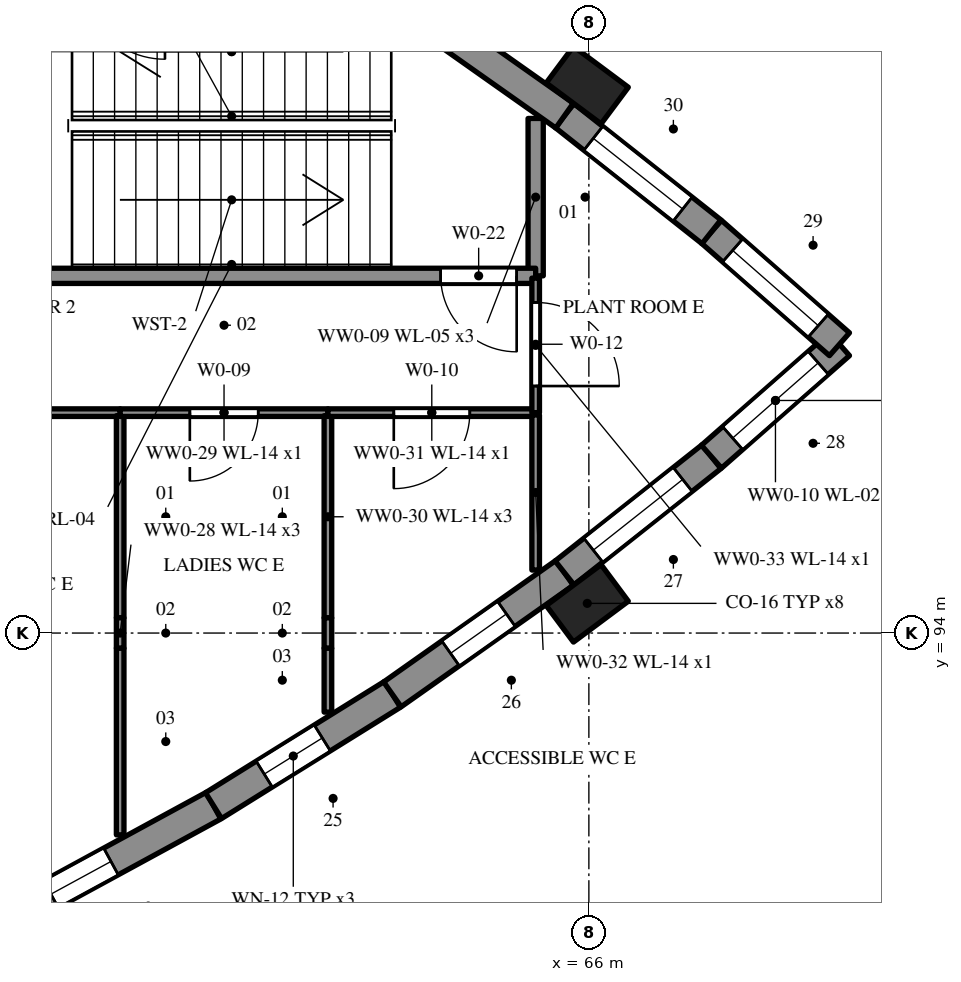
"""IFC4 building model, lengths in metres.
Left out: names, types, materials, properties, quantities, classifications, styles, units other than length and angle.
Written with IfcOpenShell. Run it as: python <this file> out.ifc"""

import sys

from ifc_helpers import new_model, si_unit, direction, frame, frame_2d, origin, origin_2d, place, context, subcontext, project, spatial, rectangle, extrude, element, fill, save


model = new_model("IFC4")
c1 = context("Model", 3, precision=1e-05, world=origin(), true_north=direction((0.0, 1.0)))
c2 = subcontext(c1, "Body", "Model", "MODEL_VIEW")
j1 = project(units=[si_unit("LENGTHUNIT", "METRE"), si_unit("PLANEANGLEUNIT", "RADIAN")], contexts=[c1])
p1 = place(None, origin())
s1 = spatial("IfcSite", under=j1, at=p1, CompositionType="ELEMENT")
p2 = place(p1, origin())
s2 = spatial("IfcBuilding", under=s1, at=p2, CompositionType="ELEMENT")
p3 = place(p2, origin())
s3 = spatial("IfcBuildingStorey", under=s2, at=p3, CompositionType="ELEMENT", Elevation=0.0)
p4 = place(p3, frame((65.3, 100.771, -0.25), z_axis=(0.0, 0.0, 1.0), x_axis=(0.0, -1.0, 0.0)))
e1 = element("IfcWall", 1, at=p4, inside=s3, PredefinedType="SHEAR", context=c2, shape_type="SweptSolid", body=[
    extrude(rectangle(XDim=2.071, YDim=0.2, at=frame_2d((1.035, 0.0))), origin(), (0.0, 0.0, 1.0), 5.65),
])
p5 = place(p3, frame((65.3, 98.7, -0.25), z_axis=(0.0, 0.0, 1.0), x_axis=(-1.0, 0.0, 0.0)))
e2 = element("IfcWall", 2, at=p5, inside=s3, PredefinedType="SHEAR", context=c2, shape_type="SweptSolid", body=[
    extrude(rectangle(XDim=8.2, YDim=0.2, at=frame_2d((4.1, 0.0))), origin(), (0.0, 0.0, 1.0), 5.65),
])
p6 = place(p5, frame((0.25, 0.0, 0.25)))
e3 = element("IfcOpeningElement", 3, at=p6, cuts=e2, PredefinedType="OPENING", context=c2, shape_type="SweptSolid", body=[
    extrude(rectangle(XDim=1.0, YDim=2.4, at=frame_2d((0.5, 1.2))), frame((0.0, 0.11, 0.0), z_axis=(0.0, -1.0, 0.0), x_axis=(1.0, 0.0, 0.0)), (0.0, 0.0, 1.0), 0.22),
])
p7 = place(p3, frame((58.627, 90.404, -0.25), z_axis=(0.0, 0.0, 1.0), x_axis=(0.878292493566, 0.478123724308, 0.0)))
e4 = element("IfcWall", 4, at=p7, inside=s3, PredefinedType="SOLIDWALL", context=c2, shape_type="SweptSolid", body=[
    extrude(rectangle(XDim=2.772, YDim=0.4, at=frame_2d((1.386, 0.0))), origin(), (0.0, 0.0, 1.0), 5.65),
])
p8 = place(p7, frame((0.336, 0.0, 1.85)))
e5 = element("IfcOpeningElement", 5, at=p8, cuts=e4, PredefinedType="OPENING", context=c2, shape_type="SweptSolid", body=[
    extrude(rectangle(XDim=0.9, YDim=0.6, at=frame_2d((0.45, 0.3))), frame((0.0, 0.21, 0.0), z_axis=(0.0, -1.0, 0.0), x_axis=(1.0, 0.0, 0.0)), (0.0, 0.0, 1.0), 0.42),
])
p9 = place(p3, frame((61.062, 91.729, -0.25), z_axis=(0.0, 0.0, 1.0), x_axis=(0.84912946359, 0.528184772653, 0.0)))
e6 = element("IfcWall", 6, at=p9, inside=s3, PredefinedType="SOLIDWALL", context=c2, shape_type="SweptSolid", body=[
    extrude(rectangle(XDim=2.772, YDim=0.4, at=frame_2d((1.386, 0.0))), origin(), (0.0, 0.0, 1.0), 5.65),
])
p10 = place(p9, frame((0.786, 0.0, 1.85)))
e7 = element("IfcOpeningElement", 7, at=p10, cuts=e6, PredefinedType="OPENING", context=c2, shape_type="SweptSolid", body=[
    extrude(rectangle(XDim=0.9, YDim=0.6, at=frame_2d((0.45, 0.3))), frame((0.0, 0.21, 0.0), z_axis=(0.0, -1.0, 0.0), x_axis=(1.0, 0.0, 0.0)), (0.0, 0.0, 1.0), 0.42),
])
p11 = place(p3, frame((63.415, 93.193, -0.25), z_axis=(0.0, 0.0, 1.0), x_axis=(0.817028877428, 0.576596751161, 0.0)))
e8 = element("IfcWall", 8, at=p11, inside=s3, PredefinedType="SOLIDWALL", context=c2, shape_type="SweptSolid", body=[
    extrude(rectangle(XDim=2.772, YDim=0.4, at=frame_2d((1.386, 0.0))), origin(), (0.0, 0.0, 1.0), 5.65),
])
p12 = place(p11, frame((0.936, 0.0, 1.85)))
e9 = element("IfcOpeningElement", 9, at=p12, cuts=e8, PredefinedType="OPENING", context=c2, shape_type="SweptSolid", body=[
    extrude(rectangle(XDim=0.9, YDim=0.6, at=frame_2d((0.45, 0.3))), frame((0.0, 0.21, 0.0), z_axis=(0.0, -1.0, 0.0), x_axis=(1.0, 0.0, 0.0)), (0.0, 0.0, 1.0), 0.42),
])
p13 = place(p3, frame((65.68, 94.792, -0.25), z_axis=(0.0, 0.0, 1.0), x_axis=(0.784278812541, 0.620408530082, 0.0)))
e10 = element("IfcWall", 10, at=p13, inside=s3, PredefinedType="SOLIDWALL", context=c2, shape_type="SweptSolid", body=[
    extrude(rectangle(XDim=2.464, YDim=0.4, at=frame_2d((1.232, 0.0))), origin(), (0.0, 0.0, 1.0), 5.65),
])
p14 = place(p13, frame((0.482, 0.0, 2.65)))
e11 = element("IfcOpeningElement", 11, at=p14, cuts=e10, PredefinedType="OPENING", context=c2, shape_type="SweptSolid", body=[
    extrude(rectangle(XDim=1.5, YDim=0.6, at=frame_2d((0.75, 0.3))), frame((0.0, 0.21, 0.0), z_axis=(0.0, -1.0, 0.0), x_axis=(1.0, 0.0, 0.0)), (0.0, 0.0, 1.0), 0.42),
])
p15 = place(p3, frame((67.613, 96.32, -0.25), z_axis=(0.0, 0.0, 1.0), x_axis=(0.751212351098, 0.660060605973, 0.0)))
e12 = element("IfcWall", 12, at=p15, inside=s3, PredefinedType="SOLIDWALL", context=c2, shape_type="SweptSolid", body=[
    extrude(rectangle(XDim=2.242, YDim=0.4, at=frame_2d((1.121, 0.0))), origin(), (0.0, 0.0, 1.0), 5.65),
])
p16 = place(p15, frame((0.371, 0.0, 2.65)))
e13 = element("IfcOpeningElement", 13, at=p16, cuts=e12, PredefinedType="OPENING", context=c2, shape_type="SweptSolid", body=[
    extrude(rectangle(XDim=1.5, YDim=0.6, at=frame_2d((0.75, 0.3))), frame((0.0, 0.21, 0.0), z_axis=(0.0, -1.0, 0.0), x_axis=(1.0, 0.0, 0.0)), (0.0, 0.0, 1.0), 0.42),
])
p17 = place(p3, frame((69.297, 97.8, -0.25), z_axis=(0.0, 0.0, 1.0), x_axis=(-0.751212351098, 0.660060605973, 0.0)))
e14 = element("IfcWall", 14, at=p17, inside=s3, PredefinedType="SOLIDWALL", context=c2, shape_type="SweptSolid", body=[
    extrude(rectangle(XDim=2.242, YDim=0.4, at=frame_2d((1.121, 0.0))), origin(), (0.0, 0.0, 1.0), 5.65),
])
p18 = place(p17, frame((0.371, 0.0, 2.65)))
e15 = element("IfcOpeningElement", 15, at=p18, cuts=e14, PredefinedType="OPENING", context=c2, shape_type="SweptSolid", body=[
    extrude(rectangle(XDim=1.5, YDim=0.6, at=frame_2d((0.75, 0.3))), frame((0.0, 0.21, 0.0), z_axis=(0.0, -1.0, 0.0), x_axis=(1.0, 0.0, 0.0)), (0.0, 0.0, 1.0), 0.42),
])
p19 = place(p3, frame((67.613, 99.28, -0.25), z_axis=(0.0, 0.0, 1.0), x_axis=(-0.784278812541, 0.620408530082, 0.0)))
e16 = element("IfcWall", 16, at=p19, inside=s3, PredefinedType="SOLIDWALL", context=c2, shape_type="SweptSolid", body=[
    extrude(rectangle(XDim=2.464, YDim=0.4, at=frame_2d((1.232, 0.0))), origin(), (0.0, 0.0, 1.0), 5.65),
])
p20 = place(p19, frame((0.482, 0.0, 2.65)))
e17 = element("IfcOpeningElement", 17, at=p20, cuts=e16, PredefinedType="OPENING", context=c2, shape_type="SweptSolid", body=[
    extrude(rectangle(XDim=1.5, YDim=0.6, at=frame_2d((0.75, 0.3))), frame((0.0, 0.21, 0.0), z_axis=(0.0, -1.0, 0.0), x_axis=(1.0, 0.0, 0.0)), (0.0, 0.0, 1.0), 0.42),
])
p21 = place(p3, frame((65.68, 100.809, -0.25), z_axis=(0.0, 0.0, 1.0), x_axis=(-0.817070367038, 0.57653795652, 0.0)))
e18 = element("IfcWall", 18, at=p21, inside=s3, PredefinedType="SOLIDWALL", context=c2, shape_type="SweptSolid", body=[
    extrude(rectangle(XDim=2.772, YDim=0.4, at=frame_2d((1.386, 0.0))), origin(), (0.0, 0.0, 1.0), 5.65),
])
for number, where, z_axis, x_axis in (
    (19, (65.979, 94.391, -0.25), (0.0, 0.0, 1.0), (0.802, 0.597, 0.0)),
    (20, (65.979, 101.209, -0.25), (0.0, 0.0, 1.0), (-0.802, 0.597, 0.0)),
):
    element("IfcColumn", number, at=place(p3, frame(where, z_axis=z_axis, x_axis=x_axis)), inside=s3, PredefinedType="PILASTER", context=c2, shape_type="SweptSolid", body=[
        extrude(rectangle(XDim=0.9, YDim=0.6, at=origin_2d()), origin(), (0.0, 0.0, 1.0), 5.65),
    ])
p22 = place(p3, frame((59.833, 96.9, 0.0), z_axis=(0.0, 0.0, 1.0), x_axis=(-1.0, 0.0, 0.0)))
e21 = element("IfcWall", 21, at=p22, inside=s3, PredefinedType="PARTITIONING", context=c2, shape_type="SweptSolid", body=[
    extrude(rectangle(XDim=2.658, YDim=0.1, at=frame_2d((1.329, 0.0))), origin(), (0.0, 0.0, 1.0), 5.12),
])
p23 = place(p22, frame((0.917, 0.0, 0.0)))
e22 = element("IfcOpeningElement", 22, at=p23, cuts=e21, PredefinedType="OPENING", context=c2, shape_type="SweptSolid", body=[
    extrude(rectangle(XDim=0.9, YDim=2.1, at=frame_2d((0.45, 1.05))), frame((0.0, 0.06, 0.0), z_axis=(0.0, -1.0, 0.0), x_axis=(1.0, 0.0, 0.0)), (0.0, 0.0, 1.0), 0.12),
])
p24 = place(p3, frame((59.833, 96.86, 0.0), z_axis=(0.0, 0.0, 1.0), x_axis=(0.0, -1.0, 0.0)))
e23 = element("IfcWall", 23, at=p24, inside=s3, PredefinedType="PARTITIONING", context=c2, shape_type="SweptSolid", body=[
    extrude(rectangle(XDim=2.66, YDim=0.1, at=frame_2d((1.33, 0.0))), origin(), (0.0, 0.0, 1.0), 5.12),
])
p25 = place(p3, frame((59.833, 94.2, 0.0), z_axis=(0.0, 0.0, 1.0), x_axis=(0.0, -1.0, 0.0)))
e24 = element("IfcWall", 24, at=p25, inside=s3, PredefinedType="PARTITIONING", context=c2, shape_type="SweptSolid", body=[
    extrude(rectangle(XDim=0.4, YDim=0.1, at=frame_2d((0.2, 0.0))), origin(), (0.0, 0.0, 1.0), 4.32),
])
p26 = place(p3, frame((59.833, 93.8, 0.0), z_axis=(0.0, 0.0, 1.0), x_axis=(0.0, -1.0, 0.0)))
e25 = element("IfcWall", 25, at=p26, inside=s3, PredefinedType="PARTITIONING", context=c2, shape_type="SweptSolid", body=[
    extrude(rectangle(XDim=2.455, YDim=0.1, at=frame_2d((1.228, 0.0))), origin(), (0.0, 0.0, 1.0), 5.12),
])
p27 = place(p3, frame((62.567, 96.9, 0.0), z_axis=(0.0, 0.0, 1.0), x_axis=(-1.0, 0.0, 0.0)))
e26 = element("IfcWall", 26, at=p27, inside=s3, PredefinedType="PARTITIONING", context=c2, shape_type="SweptSolid", body=[
    extrude(rectangle(XDim=2.733, YDim=0.1, at=frame_2d((1.367, 0.0))), origin(), (0.0, 0.0, 1.0), 5.12),
])
p28 = place(p27, frame((0.917, 0.0, 0.0)))
e27 = element("IfcOpeningElement", 27, at=p28, cuts=e26, PredefinedType="OPENING", context=c2, shape_type="SweptSolid", body=[
    extrude(rectangle(XDim=0.9, YDim=2.1, at=frame_2d((0.45, 1.05))), frame((0.0, 0.06, 0.0), z_axis=(0.0, -1.0, 0.0), x_axis=(1.0, 0.0, 0.0)), (0.0, 0.0, 1.0), 0.12),
])
p29 = place(p3, frame((62.567, 96.86, 0.0), z_axis=(0.0, 0.0, 1.0), x_axis=(0.0, -1.0, 0.0)))
e28 = element("IfcWall", 28, at=p29, inside=s3, PredefinedType="PARTITIONING", context=c2, shape_type="SweptSolid", body=[
    extrude(rectangle(XDim=2.66, YDim=0.1, at=frame_2d((1.33, 0.0))), origin(), (0.0, 0.0, 1.0), 5.12),
])
p30 = place(p3, frame((62.567, 94.2, 0.0), z_axis=(0.0, 0.0, 1.0), x_axis=(0.0, -1.0, 0.0)))
e29 = element("IfcWall", 29, at=p30, inside=s3, PredefinedType="PARTITIONING", context=c2, shape_type="SweptSolid", body=[
    extrude(rectangle(XDim=0.4, YDim=0.1, at=frame_2d((0.2, 0.0))), origin(), (0.0, 0.0, 1.0), 4.32),
])
p31 = place(p3, frame((62.567, 93.8, 0.0), z_axis=(0.0, 0.0, 1.0), x_axis=(0.0, -1.0, 0.0)))
e30 = element("IfcWall", 30, at=p31, inside=s3, PredefinedType="PARTITIONING", context=c2, shape_type="SweptSolid", body=[
    extrude(rectangle(XDim=0.84, YDim=0.1, at=frame_2d((0.42, 0.0))), origin(), (0.0, 0.0, 1.0), 5.12),
])
p32 = place(p3, frame((65.3, 96.9, 0.0), z_axis=(0.0, 0.0, 1.0), x_axis=(-1.0, 0.0, 0.0)))
e31 = element("IfcWall", 31, at=p32, inside=s3, PredefinedType="PARTITIONING", context=c2, shape_type="SweptSolid", body=[
    extrude(rectangle(XDim=2.733, YDim=0.1, at=frame_2d((1.367, 0.0))), origin(), (0.0, 0.0, 1.0), 5.12),
])
p33 = place(p32, frame((0.867, 0.0, 0.0)))
e32 = element("IfcOpeningElement", 32, at=p33, cuts=e31, PredefinedType="OPENING", context=c2, shape_type="SweptSolid", body=[
    extrude(rectangle(XDim=1.0, YDim=2.1, at=frame_2d((0.5, 1.05))), frame((0.0, 0.06, 0.0), z_axis=(0.0, -1.0, 0.0), x_axis=(1.0, 0.0, 0.0)), (0.0, 0.0, 1.0), 0.12),
])
p34 = place(p3, frame((65.3, 96.87, 0.0), z_axis=(0.0, 0.0, 1.0), x_axis=(0.0, -1.0, 0.0)))
e33 = element("IfcWall", 33, at=p34, inside=s3, PredefinedType="PARTITIONING", context=c2, shape_type="SweptSolid", body=[
    extrude(rectangle(XDim=2.041, YDim=0.1, at=frame_2d((1.021, 0.0))), origin(), (0.0, 0.0, 1.0), 5.12),
])
p35 = place(p3, frame((65.3, 98.67, 0.0), z_axis=(0.0, 0.0, 1.0), x_axis=(0.0, -1.0, 0.0)))
e34 = element("IfcWall", 34, at=p35, inside=s3, PredefinedType="PARTITIONING", context=c2, shape_type="SweptSolid", body=[
    extrude(rectangle(XDim=1.77, YDim=0.1, at=frame_2d((0.885, 0.0))), origin(), (0.0, 0.0, 1.0), 5.12),
])
p36 = place(p35, frame((0.32, 0.0, 0.0)))
e35 = element("IfcOpeningElement", 35, at=p36, cuts=e34, PredefinedType="OPENING", context=c2, shape_type="SweptSolid", body=[
    extrude(rectangle(XDim=1.1, YDim=2.1, at=frame_2d((0.55, 1.05))), frame((0.0, 0.06, 0.0), z_axis=(0.0, -1.0, 0.0), x_axis=(1.0, 0.0, 0.0)), (0.0, 0.0, 1.0), 0.12),
])
p37 = place(p8, origin())
e36 = element("IfcWindow", 36, at=p37, inside=s3, PartitioningType="SINGLE_PANEL", PredefinedType="WINDOW", context=c2, shape_type="SweptSolid", body=[
    extrude(rectangle(XDim=0.9, YDim=0.6, at=frame_2d((0.45, 0.3))), frame((0.0, 0.03, 0.0), z_axis=(0.0, -1.0, 0.0), x_axis=(1.0, 0.0, 0.0)), (0.0, 0.0, 1.0), 0.06),
])
fill(e5, e36)
p38 = place(p10, origin())
e37 = element("IfcWindow", 37, at=p38, inside=s3, PartitioningType="SINGLE_PANEL", PredefinedType="WINDOW", context=c2, shape_type="SweptSolid", body=[
    extrude(rectangle(XDim=0.9, YDim=0.6, at=frame_2d((0.45, 0.3))), frame((0.0, 0.03, 0.0), z_axis=(0.0, -1.0, 0.0), x_axis=(1.0, 0.0, 0.0)), (0.0, 0.0, 1.0), 0.06),
])
fill(e7, e37)
p39 = place(p12, origin())
e38 = element("IfcWindow", 38, at=p39, inside=s3, PartitioningType="SINGLE_PANEL", PredefinedType="WINDOW", context=c2, shape_type="SweptSolid", body=[
    extrude(rectangle(XDim=0.9, YDim=0.6, at=frame_2d((0.45, 0.3))), frame((0.0, 0.03, 0.0), z_axis=(0.0, -1.0, 0.0), x_axis=(1.0, 0.0, 0.0)), (0.0, 0.0, 1.0), 0.06),
])
fill(e9, e38)
p40 = place(p14, origin())
e39 = element("IfcWindow", 39, at=p40, inside=s3, PartitioningType="SINGLE_PANEL", PredefinedType="WINDOW", context=c2, shape_type="SweptSolid", body=[
    extrude(rectangle(XDim=1.5, YDim=0.6, at=frame_2d((0.75, 0.3))), frame((0.0, 0.03, 0.0), z_axis=(0.0, -1.0, 0.0), x_axis=(1.0, 0.0, 0.0)), (0.0, 0.0, 1.0), 0.06),
])
fill(e11, e39)
p41 = place(p16, origin())
e40 = element("IfcWindow", 40, at=p41, inside=s3, PartitioningType="SINGLE_PANEL", PredefinedType="WINDOW", context=c2, shape_type="SweptSolid", body=[
    extrude(rectangle(XDim=1.5, YDim=0.6, at=frame_2d((0.75, 0.3))), frame((0.0, 0.03, 0.0), z_axis=(0.0, -1.0, 0.0), x_axis=(1.0, 0.0, 0.0)), (0.0, 0.0, 1.0), 0.06),
])
fill(e13, e40)
p42 = place(p18, origin())
e41 = element("IfcWindow", 41, at=p42, inside=s3, PartitioningType="SINGLE_PANEL", PredefinedType="WINDOW", context=c2, shape_type="SweptSolid", body=[
    extrude(rectangle(XDim=1.5, YDim=0.6, at=frame_2d((0.75, 0.3))), frame((0.0, 0.03, 0.0), z_axis=(0.0, -1.0, 0.0), x_axis=(1.0, 0.0, 0.0)), (0.0, 0.0, 1.0), 0.06),
])
fill(e15, e41)
p43 = place(p20, origin())
e42 = element("IfcWindow", 42, at=p43, inside=s3, PartitioningType="SINGLE_PANEL", PredefinedType="WINDOW", context=c2, shape_type="SweptSolid", body=[
    extrude(rectangle(XDim=1.5, YDim=0.6, at=frame_2d((0.75, 0.3))), frame((0.0, 0.03, 0.0), z_axis=(0.0, -1.0, 0.0), x_axis=(1.0, 0.0, 0.0)), (0.0, 0.0, 1.0), 0.06),
])
fill(e17, e42)
p44 = place(p28, origin())
e43 = element("IfcDoor", 43, at=p44, inside=s3, OperationType="SINGLE_SWING_RIGHT", PredefinedType="DOOR", context=c2, shape_type="SweptSolid", body=[
    extrude(rectangle(XDim=0.9, YDim=2.1, at=frame_2d((0.45, 1.05))), frame((0.0, 0.025, 0.0), z_axis=(0.0, -1.0, 0.0), x_axis=(1.0, 0.0, 0.0)), (0.0, 0.0, 1.0), 0.05),
])
fill(e27, e43)
p45 = place(p33, origin())
e44 = element("IfcDoor", 44, at=p45, inside=s3, OperationType="SINGLE_SWING_RIGHT", PredefinedType="DOOR", context=c2, shape_type="SweptSolid", body=[
    extrude(rectangle(XDim=1.0, YDim=2.1, at=frame_2d((0.5, 1.05))), frame((0.0, 0.025, 0.0), z_axis=(0.0, -1.0, 0.0), x_axis=(1.0, 0.0, 0.0)), (0.0, 0.0, 1.0), 0.05),
])
fill(e32, e44)
p46 = place(p36, origin())
e45 = element("IfcDoor", 45, at=p46, inside=s3, OperationType="SINGLE_SWING_RIGHT", PredefinedType="DOOR", context=c2, shape_type="SweptSolid", body=[
    extrude(rectangle(XDim=1.1, YDim=2.1, at=frame_2d((0.55, 1.05))), frame((0.0, 0.025, 0.0), z_axis=(0.0, -1.0, 0.0), x_axis=(1.0, 0.0, 0.0)), (0.0, 0.0, 1.0), 0.05),
])
fill(e35, e45)
p47 = place(p6, origin())
e46 = element("IfcDoor", 46, at=p47, inside=s3, OperationType="SINGLE_SWING_LEFT", PredefinedType="DOOR", context=c2, shape_type="SweptSolid", body=[
    extrude(rectangle(XDim=1.0, YDim=2.4, at=frame_2d((0.5, 1.2))), frame((0.0, 0.025, 0.0), z_axis=(0.0, -1.0, 0.0), x_axis=(1.0, 0.0, 0.0)), (0.0, 0.0, 1.0), 0.05),
])
fill(e3, e46)
save(model, sys.argv[1])
